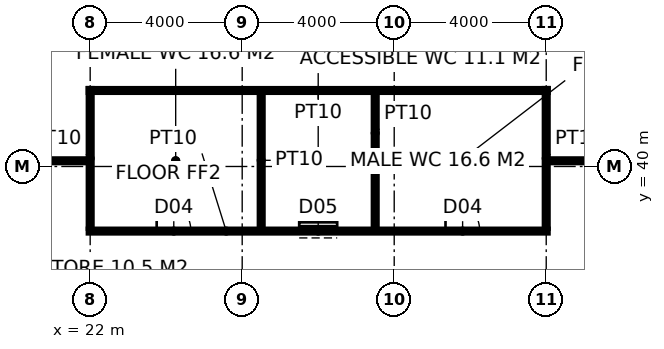
"""IFC4 building model, lengths in metres.
Left out: names, types, materials, properties, quantities, classifications, styles, units other than length and angle.
Written with IfcOpenShell. Run it as: python <this file> out.ifc"""

import sys

from ifc_helpers import new_model, si_unit, direction, frame, frame_2d, origin, place, context, subcontext, project, spatial, rectangle, extrude, element, fill, save


model = new_model("IFC4")
c1 = context("Model", 3, precision=1e-05, world=origin(), true_north=direction((0.0, 1.0)))
c2 = subcontext(c1, "Body", "Model", "MODEL_VIEW")
j1 = project(units=[si_unit("LENGTHUNIT", "METRE"), si_unit("PLANEANGLEUNIT", "RADIAN")], contexts=[c1])
p1 = place(None, origin())
s1 = spatial("IfcSite", under=j1, at=p1, CompositionType="ELEMENT")
p2 = place(p1, origin())
s2 = spatial("IfcBuilding", under=s1, at=p2, CompositionType="ELEMENT")
p3 = place(p2, frame((0.0, 0.0, 214.2)))
s3 = spatial("IfcBuildingStorey", under=s2, at=p3, CompositionType="ELEMENT", Elevation=214.2)
p4 = place(p3, frame((21.95, 38.3, 0.0), z_axis=(0.0, 0.0, 1.0), x_axis=(1.0, 0.0, 0.0)))
e1 = element("IfcWall", 1, at=p4, inside=s3, PredefinedType="PARTITIONING", context=c2, shape_type="SweptSolid", body=[
    extrude(rectangle(XDim=12.1, YDim=0.1, at=frame_2d((6.05, 0.0))), origin(), (0.0, 0.0, 1.0), 3.85),
])
p5 = place(p4, frame((1.8, 0.0, 0.0)))
e2 = element("IfcOpeningElement", 2, at=p5, cuts=e1, PredefinedType="OPENING", context=c2, shape_type="SweptSolid", body=[
    extrude(rectangle(XDim=0.9, YDim=2.1, at=frame_2d((0.45, 1.05))), frame((0.0, 0.06, 0.0), z_axis=(0.0, -1.0, 0.0), x_axis=(1.0, 0.0, 0.0)), (0.0, 0.0, 1.0), 0.12),
])
p6 = place(p4, frame((5.55, 0.0, 0.0)))
e3 = element("IfcOpeningElement", 3, at=p6, cuts=e1, PredefinedType="OPENING", context=c2, shape_type="SweptSolid", body=[
    extrude(rectangle(XDim=1.0, YDim=2.1, at=frame_2d((0.5, 1.05))), frame((0.0, 0.06, 0.0), z_axis=(0.0, -1.0, 0.0), x_axis=(1.0, 0.0, 0.0)), (0.0, 0.0, 1.0), 0.12),
])
p7 = place(p4, frame((9.4, 0.0, 0.0)))
e4 = element("IfcOpeningElement", 4, at=p7, cuts=e1, PredefinedType="OPENING", context=c2, shape_type="SweptSolid", body=[
    extrude(rectangle(XDim=0.9, YDim=2.1, at=frame_2d((0.45, 1.05))), frame((0.0, 0.06, 0.0), z_axis=(0.0, -1.0, 0.0), x_axis=(1.0, 0.0, 0.0)), (0.0, 0.0, 1.0), 0.12),
])
for number, where, z_axis, x_axis in (
    (5, (22.0, 38.375, 0.0), (0.0, 0.0, 1.0), (0.0, 1.0, 0.0)),
    (6, (34.0, 38.375, 0.0), (0.0, 0.0, 1.0), (0.0, 1.0, 0.0)),
):
    element("IfcWall", number, at=place(p3, frame(where, z_axis=z_axis, x_axis=x_axis)), inside=s3, PredefinedType="PARTITIONING", context=c2, shape_type="SweptSolid", body=[
        extrude(rectangle(XDim=3.675, YDim=0.1, at=frame_2d((1.837, 0.0))), origin(), (0.0, 0.0, 1.0), 2.95),
    ])
p8 = place(p3, frame((21.95, 42.0, 0.0), z_axis=(0.0, 0.0, 1.0), x_axis=(1.0, 0.0, 0.0)))
e7 = element("IfcWall", 7, at=p8, inside=s3, PredefinedType="PARTITIONING", context=c2, shape_type="SweptSolid", body=[
    extrude(rectangle(XDim=12.1, YDim=0.1, at=frame_2d((6.05, 0.0))), origin(), (0.0, 0.0, 1.0), 3.85),
])
for number, where, z_axis, x_axis in (
    (8, (26.5, 38.375, 0.0), (0.0, 0.0, 1.0), (0.0, 1.0, 0.0)),
    (9, (29.5, 38.375, 0.0), (0.0, 0.0, 1.0), (0.0, 1.0, 0.0)),
):
    element("IfcWall", number, at=place(p3, frame(where, z_axis=z_axis, x_axis=x_axis)), inside=s3, PredefinedType="PARTITIONING", context=c2, shape_type="SweptSolid", body=[
        extrude(rectangle(XDim=3.575, YDim=0.1, at=frame_2d((1.788, 0.0))), origin(), (0.0, 0.0, 1.0), 3.85),
    ])
p9 = place(p3, frame((10.3, 40.15, 0.0), z_axis=(0.0, 0.0, 1.0), x_axis=(1.0, 0.0, 0.0)))
e10 = element("IfcWall", 10, at=p9, inside=s3, PredefinedType="PARTITIONING", context=c2, shape_type="SweptSolid", body=[
    extrude(rectangle(XDim=11.7, YDim=0.1, at=frame_2d((5.85, 0.0))), origin(), (0.0, 0.0, 1.0), 3.85),
])
p10 = place(p9, frame((5.35, 0.0, 0.0)))
e11 = element("IfcOpeningElement", 11, at=p10, cuts=e10, PredefinedType="OPENING", context=c2, shape_type="SweptSolid", body=[
    extrude(rectangle(XDim=1.0, YDim=2.2, at=frame_2d((0.5, 1.1))), frame((0.0, 0.06, 0.0), z_axis=(0.0, -1.0, 0.0), x_axis=(1.0, 0.0, 0.0)), (0.0, 0.0, 1.0), 0.12),
])
p11 = place(p3, frame((34.0, 40.15, 0.0), z_axis=(0.0, 0.0, 1.0), x_axis=(1.0, 0.0, 0.0)))
e12 = element("IfcWall", 12, at=p11, inside=s3, PredefinedType="PARTITIONING", context=c2, shape_type="SweptSolid", body=[
    extrude(rectangle(XDim=4.425, YDim=0.1, at=frame_2d((2.212, 0.0))), origin(), (0.0, 0.0, 1.0), 3.85),
])
p12 = place(p5, origin())
e13 = element("IfcDoor", 13, at=p12, inside=s3, OperationType="SINGLE_SWING_LEFT", PredefinedType="DOOR", context=c2, shape_type="SweptSolid", body=[
    extrude(rectangle(XDim=0.9, YDim=2.1, at=frame_2d((0.45, 1.05))), frame((0.0, 0.025, 0.0), z_axis=(0.0, -1.0, 0.0), x_axis=(1.0, 0.0, 0.0)), (0.0, 0.0, 1.0), 0.05),
])
fill(e2, e13)
p13 = place(p6, origin())
e14 = element("IfcDoor", 14, at=p13, inside=s3, OperationType="SLIDING_TO_LEFT", PredefinedType="DOOR", context=c2, shape_type="SweptSolid", body=[
    extrude(rectangle(XDim=1.0, YDim=2.1, at=frame_2d((0.5, 1.05))), frame((0.0, 0.025, 0.0), z_axis=(0.0, -1.0, 0.0), x_axis=(1.0, 0.0, 0.0)), (0.0, 0.0, 1.0), 0.05),
])
fill(e3, e14)
p14 = place(p7, origin())
e15 = element("IfcDoor", 15, at=p14, inside=s3, OperationType="SINGLE_SWING_LEFT", PredefinedType="DOOR", context=c2, shape_type="SweptSolid", body=[
    extrude(rectangle(XDim=0.9, YDim=2.1, at=frame_2d((0.45, 1.05))), frame((0.0, 0.025, 0.0), z_axis=(0.0, -1.0, 0.0), x_axis=(1.0, 0.0, 0.0)), (0.0, 0.0, 1.0), 0.05),
])
fill(e4, e15)
save(model, sys.argv[1])
